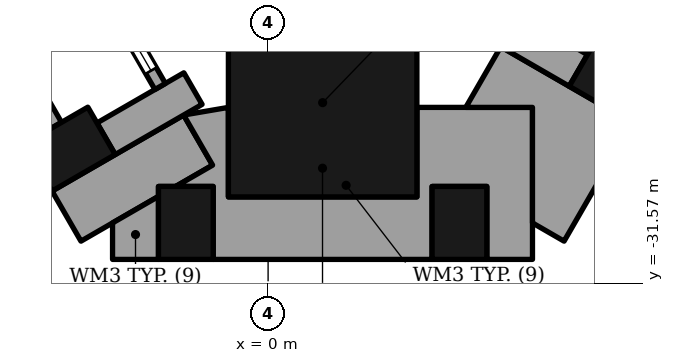
"""IFC4 building model, lengths in metres.
Left out: names, types, materials, properties, quantities, classifications, styles, units other than length and angle.
Written with IfcOpenShell. Run it as: python <this file> out.ifc"""

import sys

from ifc_helpers import new_model, si_unit, direction, frame, frame_2d, origin, origin_2d, place, context, subcontext, project, spatial, polyline, rectangle, outline, extrude, element, fill, save


model = new_model("IFC4")
c1 = context("Model", 3, precision=1e-05, world=origin(), true_north=direction((0.0, 1.0)))
c2 = subcontext(c1, "Body", "Model", "MODEL_VIEW")
j1 = project(units=[si_unit("LENGTHUNIT", "METRE"), si_unit("PLANEANGLEUNIT", "RADIAN")], contexts=[c1])
p1 = place(None, origin())
s1 = spatial("IfcSite", under=j1, at=p1, CompositionType="ELEMENT")
p2 = place(p1, origin())
s2 = spatial("IfcBuilding", under=s1, at=p2, CompositionType="ELEMENT")
p3 = place(p2, frame((0.0, 0.0, 76.6)))
s3 = spatial("IfcBuildingStorey", under=s2, at=p3, CompositionType="ELEMENT", Elevation=76.6)
p4 = place(p3, frame((0.897, -28.596, 0.0), z_axis=(0.0, 0.0, 1.0), x_axis=(0.0, 1.0, 0.0)))
e1 = element("IfcColumn", 1, at=p4, inside=s3, PredefinedType="COLUMN", context=c2, shape_type="SweptSolid", body=[
    extrude(rectangle(XDim=3.1, YDim=3.1, at=origin_2d()), origin(), (0.0, 0.0, 1.0), 3.4),
])
for number, where, z_axis, x_axis in (
    (2, (-3.259, -29.36, 0.0), (0.0, 0.0, 1.0), (0.5, -0.866, 0.0)),
    (3, (-1.353, -30.574, 0.0), (0.0, 0.0, 1.0), (1.0, 0.0, 0.0)),
    (4, (3.147, -30.574, 0.0), (0.0, 0.0, 1.0), (1.0, 0.0, 0.0)),
    (5, (5.697, -28.237, 0.0), (0.0, 0.0, 1.0), (0.5, 0.866, 0.0)),
):
    element("IfcColumn", number, at=place(p3, frame(where, z_axis=z_axis, x_axis=x_axis)), inside=s3, PredefinedType="COLUMN", context=c2, shape_type="SweptSolid", body=[
        extrude(rectangle(XDim=0.9, YDim=1.2, at=origin_2d()), origin(), (0.0, 0.0, 1.0), 3.4),
    ])
p5 = place(p3, frame((-2.665, -29.19, 0.0), z_axis=(0.0, 0.0, 1.0), x_axis=(0.866040211805, 0.499974350878, 0.0)))
e6 = element("IfcWall", 6, at=p5, inside=s3, PredefinedType="SOLIDWALL", context=c2, shape_type="SweptSolid", body=[
    extrude(rectangle(XDim=1.65, YDim=0.6, at=frame_2d((0.825, 0.0))), origin(), (0.0, 0.0, 1.0), 2.63),
])
p6 = place(p3, frame((-5.284, -25.853, 0.0), z_axis=(0.0, 0.0, 1.0), x_axis=(0.500012057535, -0.866018442252, 0.0)))
e7 = element("IfcWall", 7, at=p6, inside=s3, PredefinedType="SOLIDWALL", context=c2, shape_type="SweptSolid", body=[
    extrude(rectangle(XDim=3.6, YDim=0.2, at=frame_2d((1.8, 0.0))), origin(), (0.0, 0.0, 1.0), 2.45),
])
p7 = place(p3, frame((-3.875, -24.693, 0.0), z_axis=(0.0, 0.0, 1.0), x_axis=(0.499958946799, -0.866049104564, 0.0)))
e8 = element("IfcWall", 8, at=p7, inside=s3, PredefinedType="ELEMENTEDWALL", context=c2, shape_type="SweptSolid", body=[
    extrude(rectangle(XDim=4.2, YDim=0.2, at=frame_2d((2.1, 0.0))), origin(), (0.0, 0.0, 1.0), 2.45),
])
p8 = place(p7, frame((0.3, 0.0, 0.6)))
e9 = element("IfcOpeningElement", 9, at=p8, cuts=e8, PredefinedType="OPENING", context=c2, shape_type="SweptSolid", body=[
    extrude(rectangle(XDim=2.1, YDim=1.75, at=frame_2d((1.05, 0.875))), frame((0.0, 0.11, 0.0), z_axis=(0.0, -1.0, 0.0), x_axis=(1.0, 0.0, 0.0)), (0.0, 0.0, 1.0), 0.22),
])
p9 = place(p7, frame((2.7, 0.0, 0.0)))
e10 = element("IfcOpeningElement", 10, at=p9, cuts=e8, PredefinedType="OPENING", context=c2, shape_type="SweptSolid", body=[
    extrude(rectangle(XDim=1.2, YDim=2.35, at=frame_2d((0.6, 1.175))), frame((0.0, 0.11, 0.0), z_axis=(0.0, -1.0, 0.0), x_axis=(1.0, 0.0, 0.0)), (0.0, 0.0, 1.0), 0.22),
])
p10 = place(p3, frame((5.103, -28.067, 0.0), z_axis=(0.0, 0.0, 1.0), x_axis=(-0.866003217194, 0.500038426333, 0.0)))
e11 = element("IfcWall", 11, at=p10, inside=s3, PredefinedType="SOLIDWALL", context=c2, shape_type="SweptSolid", body=[
    extrude(rectangle(XDim=1.65, YDim=0.6, at=frame_2d((0.825, 0.0))), origin(), (0.0, 0.0, 1.0), 2.65),
])
p11 = place(p3, origin())
e12 = element("IfcWall", 12, at=p11, inside=s3, PredefinedType="SOLIDWALL", context=c2, shape_type="SweptSolid", body=[
    extrude(outline(polyline([(-0.913, -29.624), (-1.389, -28.8), (-3.554, -30.05), (-3.078, -30.874), (-1.803, -30.138), (-1.803, -29.974), (-1.519, -29.974), (-0.913, -29.624)])), origin(), (0.0, 0.0, 1.0), 2.63),
])
p12 = place(p3, origin())
e13 = element("IfcWall", 13, at=p12, inside=s3, PredefinedType="SOLIDWALL", context=c2, shape_type="SweptSolid", body=[
    extrude(outline(polyline([(-2.558, -30.574), (-2.558, -31.174), (-1.803, -31.174), (-1.803, -30.138), (-2.558, -30.574)])), origin(), (0.0, 0.0, 1.0), 2.63),
])
p13 = place(p3, origin())
e14 = element("IfcWall", 14, at=p13, inside=s3, PredefinedType="SOLIDWALL", context=c2, shape_type="SweptSolid", body=[
    extrude(outline(polyline([(-0.653, -30.146), (-0.653, -28.674), (-1.389, -28.8), (-0.913, -29.624), (-1.519, -29.974), (-0.903, -29.974), (-0.903, -31.174), (2.697, -31.174), (2.697, -29.974), (3.597, -29.974), (3.597, -31.174), (4.348, -31.174), (4.348, -28.674), (2.447, -28.674), (2.447, -30.146), (-0.653, -30.146)])), origin(), (0.0, 0.0, 1.0), 2.63),
])
p14 = place(p3, origin())
e15 = element("IfcWall", 15, at=p14, inside=s3, PredefinedType="SOLIDWALL", context=c2, shape_type="SweptSolid", body=[
    extrude(outline(polyline([(5.992, -28.927), (3.827, -27.677), (3.251, -28.674), (4.348, -28.674), (4.348, -30.574), (4.868, -30.874), (5.992, -28.927)])), origin(), (0.0, 0.0, 1.0), 2.63),
])
p15 = place(p9, origin())
e16 = element("IfcDoor", 16, at=p15, inside=s3, OperationType="SINGLE_SWING_LEFT", PredefinedType="DOOR", context=c2, shape_type="SweptSolid", body=[
    extrude(rectangle(XDim=1.2, YDim=2.35, at=frame_2d((0.6, 1.175))), frame((0.0, 0.025, 0.0), z_axis=(0.0, -1.0, 0.0), x_axis=(1.0, 0.0, 0.0)), (0.0, 0.0, 1.0), 0.05),
])
fill(e10, e16)
save(model, sys.argv[1])
